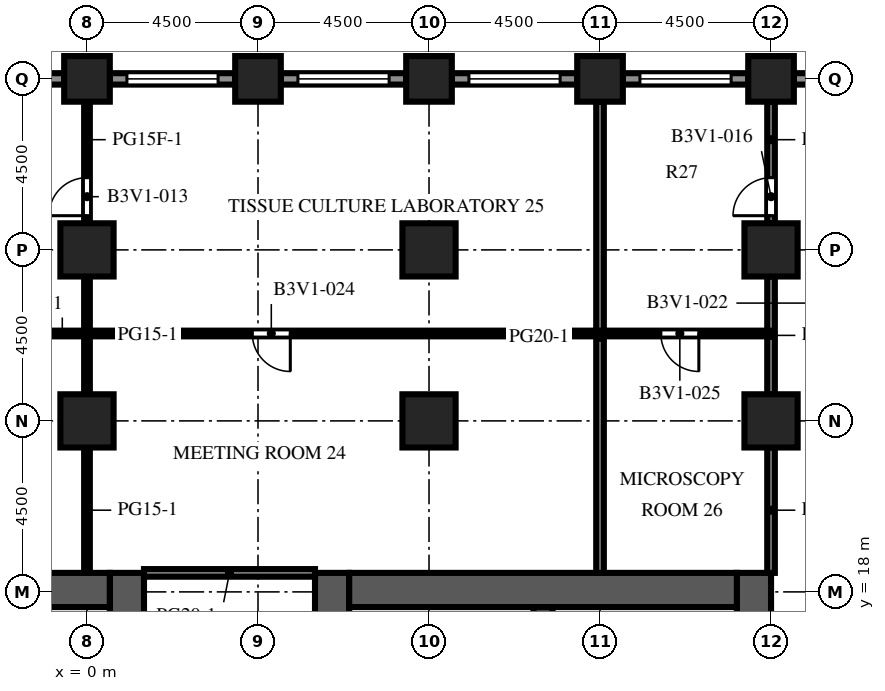
"""IFC4 building model, lengths in metres.
Left out: names, types, materials, properties, quantities, classifications, styles, units other than length and angle.
Written with IfcOpenShell. Run it as: python <this file> out.ifc"""

import sys

from ifc_helpers import new_model, si_unit, direction, frame, frame_2d, origin, origin_2d, place, context, subcontext, project, spatial, rectangle, extrude, element, fill, save


model = new_model("IFC4")
c1 = context("Model", 3, precision=1e-05, world=origin(), true_north=direction((0.0, 1.0)))
c2 = subcontext(c1, "Body", "Model", "MODEL_VIEW")
j1 = project(units=[si_unit("LENGTHUNIT", "METRE"), si_unit("PLANEANGLEUNIT", "RADIAN")], contexts=[c1])
p1 = place(None, origin())
s1 = spatial("IfcSite", under=j1, at=p1, CompositionType="ELEMENT")
p2 = place(p1, origin())
s2 = spatial("IfcBuilding", under=s1, at=p2, CompositionType="ELEMENT")
p3 = place(p2, frame((0.0, 0.0, 86.1)))
s3 = spatial("IfcBuildingStorey", under=s2, at=p3, CompositionType="ELEMENT", Elevation=86.1)
for number, where, z_axis, x_axis in (
    (1, (0.0, 31.5, 0.0), (0.0, 0.0, 1.0), (1.0, 0.0, 0.0)),
    (2, (4.5, 31.5, 0.0), (0.0, 0.0, 1.0), (1.0, 0.0, 0.0)),
    (3, (9.0, 31.5, 0.0), (0.0, 0.0, 1.0), (1.0, 0.0, 0.0)),
    (4, (13.5, 31.5, 0.0), (0.0, 0.0, 1.0), (1.0, 0.0, 0.0)),
    (5, (18.0, 31.5, 0.0), (0.0, 0.0, 1.0), (1.0, 0.0, 0.0)),
):
    element("IfcColumn", number, at=place(p3, frame(where, z_axis=z_axis, x_axis=x_axis)), inside=s3, PredefinedType="COLUMN", context=c2, shape_type="SweptSolid", body=[
        extrude(rectangle(XDim=1.2, YDim=1.2, at=origin_2d()), origin(), (0.0, 0.0, 1.0), 4.1),
    ])
for number, where, z_axis, x_axis in (
    (6, (0.0, 22.5, 0.0), (0.0, 0.0, 1.0), (1.0, 0.0, 0.0)),
    (7, (0.0, 27.0, 0.0), (0.0, 0.0, 1.0), (1.0, 0.0, 0.0)),
    (8, (9.0, 22.5, 0.0), (0.0, 0.0, 1.0), (1.0, 0.0, 0.0)),
    (9, (9.0, 27.0, 0.0), (0.0, 0.0, 1.0), (1.0, 0.0, 0.0)),
    (10, (18.0, 22.5, 0.0), (0.0, 0.0, 1.0), (1.0, 0.0, 0.0)),
    (11, (18.0, 27.0, 0.0), (0.0, 0.0, 1.0), (1.0, 0.0, 0.0)),
):
    element("IfcColumn", number, at=place(p3, frame(where, z_axis=z_axis, x_axis=x_axis)), inside=s3, PredefinedType="COLUMN", context=c2, shape_type="SweptSolid", body=[
        extrude(rectangle(XDim=1.4, YDim=1.4, at=origin_2d()), origin(), (0.0, 0.0, 1.0), 4.1),
    ])
p4 = place(p3, frame((1.05, -9.0, 0.0), z_axis=(0.0, 0.0, 1.0), x_axis=(0.0, 1.0, 0.0)))
e12 = element("IfcWall", 12, at=p4, inside=s3, PredefinedType="SHEAR", context=c2, shape_type="SweptSolid", body=[
    extrude(rectangle(XDim=27.5, YDim=0.9, at=frame_2d((13.75, 0.0))), origin(), (0.0, 0.0, 1.0), 4.1),
])
p5 = place(p4, frame((12.55, 0.0, 0.0)))
e13 = element("IfcOpeningElement", 13, at=p5, cuts=e12, PredefinedType="OPENING", context=c2, shape_type="SweptSolid", body=[
    extrude(rectangle(XDim=2.4, YDim=2.4, at=frame_2d((1.2, 1.2))), frame((0.0, 0.46, 0.0), z_axis=(0.0, -1.0, 0.0), x_axis=(1.0, 0.0, 0.0)), (0.0, 0.0, 1.0), 0.92),
])
p6 = place(p4, frame((3.975, 0.0, 0.0)))
e14 = element("IfcOpeningElement", 14, at=p6, cuts=e12, PredefinedType="OPENING", context=c2, shape_type="SweptSolid", body=[
    extrude(rectangle(XDim=1.2, YDim=2.1, at=frame_2d((0.6, 1.05))), frame((0.0, 0.46, 0.0), z_axis=(0.0, -1.0, 0.0), x_axis=(1.0, 0.0, 0.0)), (0.0, 0.0, 1.0), 0.92),
])
p7 = place(p4, frame((22.325, 0.0, 0.0)))
e15 = element("IfcOpeningElement", 15, at=p7, cuts=e12, PredefinedType="OPENING", context=c2, shape_type="SweptSolid", body=[
    extrude(rectangle(XDim=1.2, YDim=2.1, at=frame_2d((0.6, 1.05))), frame((0.0, 0.46, 0.0), z_axis=(0.0, -1.0, 0.0), x_axis=(1.0, 0.0, 0.0)), (0.0, 0.0, 1.0), 0.92),
])
p8 = place(p3, frame((-9.6, 18.05, 0.0), z_axis=(0.0, 0.0, 1.0), x_axis=(1.0, 0.0, 0.0)))
e16 = element("IfcWall", 16, at=p8, inside=s3, PredefinedType="SHEAR", context=c2, shape_type="SweptSolid", body=[
    extrude(rectangle(XDim=10.2, YDim=0.9, at=frame_2d((5.1, 0.0))), origin(), (0.0, 0.0, 1.0), 4.1),
])
p9 = place(p3, frame((6.45, -9.0, 0.0), z_axis=(0.0, 0.0, 1.0), x_axis=(0.0, 1.0, 0.0)))
e17 = element("IfcWall", 17, at=p9, inside=s3, PredefinedType="SHEAR", context=c2, shape_type="SweptSolid", body=[
    extrude(rectangle(XDim=27.5, YDim=0.9, at=frame_2d((13.75, 0.0))), origin(), (0.0, 0.0, 1.0), 4.1),
])
p10 = place(p9, frame((12.55, 0.0, 0.0)))
e18 = element("IfcOpeningElement", 18, at=p10, cuts=e17, PredefinedType="OPENING", context=c2, shape_type="SweptSolid", body=[
    extrude(rectangle(XDim=2.4, YDim=2.4, at=frame_2d((1.2, 1.2))), frame((0.0, 0.46, 0.0), z_axis=(0.0, -1.0, 0.0), x_axis=(1.0, 0.0, 0.0)), (0.0, 0.0, 1.0), 0.92),
])
p11 = place(p9, frame((3.975, 0.0, 0.0)))
e19 = element("IfcOpeningElement", 19, at=p11, cuts=e17, PredefinedType="OPENING", context=c2, shape_type="SweptSolid", body=[
    extrude(rectangle(XDim=1.2, YDim=2.1, at=frame_2d((0.6, 1.05))), frame((0.0, 0.46, 0.0), z_axis=(0.0, -1.0, 0.0), x_axis=(1.0, 0.0, 0.0)), (0.0, 0.0, 1.0), 0.92),
])
p12 = place(p9, frame((22.325, 0.0, 0.0)))
e20 = element("IfcOpeningElement", 20, at=p12, cuts=e17, PredefinedType="OPENING", context=c2, shape_type="SweptSolid", body=[
    extrude(rectangle(XDim=1.2, YDim=2.1, at=frame_2d((0.6, 1.05))), frame((0.0, 0.46, 0.0), z_axis=(0.0, -1.0, 0.0), x_axis=(1.0, 0.0, 0.0)), (0.0, 0.0, 1.0), 0.92),
])
p13 = place(p3, frame((17.55, -9.0, 0.0), z_axis=(0.0, 0.0, 1.0), x_axis=(0.0, 1.0, 0.0)))
e21 = element("IfcWall", 21, at=p13, inside=s3, PredefinedType="SHEAR", context=c2, shape_type="SweptSolid", body=[
    extrude(rectangle(XDim=27.5, YDim=0.9, at=frame_2d((13.75, 0.0))), origin(), (0.0, 0.0, 1.0), 4.1),
])
p14 = place(p13, frame((12.55, 0.0, 0.0)))
e22 = element("IfcOpeningElement", 22, at=p14, cuts=e21, PredefinedType="OPENING", context=c2, shape_type="SweptSolid", body=[
    extrude(rectangle(XDim=2.4, YDim=2.4, at=frame_2d((1.2, 1.2))), frame((0.0, 0.46, 0.0), z_axis=(0.0, -1.0, 0.0), x_axis=(1.0, 0.0, 0.0)), (0.0, 0.0, 1.0), 0.92),
])
p15 = place(p13, frame((6.825, 0.0, 0.0)))
e23 = element("IfcOpeningElement", 23, at=p15, cuts=e21, PredefinedType="OPENING", context=c2, shape_type="SweptSolid", body=[
    extrude(rectangle(XDim=1.2, YDim=2.1, at=frame_2d((0.6, 1.05))), frame((0.0, 0.46, 0.0), z_axis=(0.0, -1.0, 0.0), x_axis=(1.0, 0.0, 0.0)), (0.0, 0.0, 1.0), 0.92),
])
p16 = place(p13, frame((19.475, 0.0, 0.0)))
e24 = element("IfcOpeningElement", 24, at=p16, cuts=e21, PredefinedType="OPENING", context=c2, shape_type="SweptSolid", body=[
    extrude(rectangle(XDim=1.2, YDim=2.1, at=frame_2d((0.6, 1.05))), frame((0.0, 0.46, 0.0), z_axis=(0.0, -1.0, 0.0), x_axis=(1.0, 0.0, 0.0)), (0.0, 0.0, 1.0), 0.92),
])
p17 = place(p3, frame((6.9, 18.05, 0.0), z_axis=(0.0, 0.0, 1.0), x_axis=(1.0, 0.0, 0.0)))
e25 = element("IfcWall", 25, at=p17, inside=s3, PredefinedType="SHEAR", context=c2, shape_type="SweptSolid", body=[
    extrude(rectangle(XDim=10.2, YDim=0.9, at=frame_2d((5.1, 0.0))), origin(), (0.0, 0.0, 1.0), 4.1),
])
p18 = place(p3, frame((12.0, 10.25, 0.0), z_axis=(0.0, 0.0, 1.0), x_axis=(0.0, 1.0, 0.0)))
e26 = element("IfcWall", 26, at=p18, inside=s3, PredefinedType="SHEAR", context=c2, shape_type="SweptSolid", body=[
    extrude(rectangle(XDim=7.35, YDim=0.5, at=frame_2d((3.675, 0.0))), origin(), (0.0, 0.0, 1.0), 4.1),
])
p19 = place(p3, frame((18.6, 31.5, 0.0), z_axis=(0.0, 0.0, 1.0), x_axis=(1.0, 0.0, 0.0)))
e27 = element("IfcWall", 27, at=p19, inside=s3, PredefinedType="SOLIDWALL", context=c2, shape_type="SweptSolid", body=[
    extrude(rectangle(XDim=3.3, YDim=0.3, at=frame_2d((1.65, 0.0))), origin(), (0.0, 0.0, 1.0), 2.75),
])
p20 = place(p19, frame((1.15, 0.0, 0.0)))
e28 = element("IfcOpeningElement", 28, at=p20, cuts=e27, PredefinedType="OPENING", context=c2, shape_type="SweptSolid", body=[
    extrude(rectangle(XDim=1.0, YDim=2.2, at=frame_2d((0.5, 1.1))), frame((0.0, 0.16, 0.0), z_axis=(0.0, -1.0, 0.0), x_axis=(1.0, 0.0, 0.0)), (0.0, 0.0, 1.0), 0.32),
])
p21 = place(p3, frame((14.1, 31.5, 0.0), z_axis=(0.0, 0.0, 1.0), x_axis=(1.0, 0.0, 0.0)))
e29 = element("IfcWall", 29, at=p21, inside=s3, PredefinedType="SOLIDWALL", context=c2, shape_type="SweptSolid", body=[
    extrude(rectangle(XDim=3.3, YDim=0.3, at=frame_2d((1.65, 0.0))), origin(), (0.0, 0.0, 1.0), 2.75),
])
p22 = place(p21, frame((0.45, 0.0, 0.8)))
e30 = element("IfcOpeningElement", 30, at=p22, cuts=e29, PredefinedType="OPENING", context=c2, shape_type="SweptSolid", body=[
    extrude(rectangle(XDim=2.4, YDim=1.7, at=frame_2d((1.2, 0.85))), frame((0.0, 0.16, 0.0), z_axis=(0.0, -1.0, 0.0), x_axis=(1.0, 0.0, 0.0)), (0.0, 0.0, 1.0), 0.32),
])
p23 = place(p3, frame((9.6, 31.5, 0.0), z_axis=(0.0, 0.0, 1.0), x_axis=(1.0, 0.0, 0.0)))
e31 = element("IfcWall", 31, at=p23, inside=s3, PredefinedType="SOLIDWALL", context=c2, shape_type="SweptSolid", body=[
    extrude(rectangle(XDim=3.3, YDim=0.3, at=frame_2d((1.65, 0.0))), origin(), (0.0, 0.0, 1.0), 2.75),
])
p24 = place(p23, frame((0.45, 0.0, 0.8)))
e32 = element("IfcOpeningElement", 32, at=p24, cuts=e31, PredefinedType="OPENING", context=c2, shape_type="SweptSolid", body=[
    extrude(rectangle(XDim=2.4, YDim=1.7, at=frame_2d((1.2, 0.85))), frame((0.0, 0.16, 0.0), z_axis=(0.0, -1.0, 0.0), x_axis=(1.0, 0.0, 0.0)), (0.0, 0.0, 1.0), 0.32),
])
p25 = place(p3, frame((5.1, 31.5, 0.0), z_axis=(0.0, 0.0, 1.0), x_axis=(1.0, 0.0, 0.0)))
e33 = element("IfcWall", 33, at=p25, inside=s3, PredefinedType="SOLIDWALL", context=c2, shape_type="SweptSolid", body=[
    extrude(rectangle(XDim=3.3, YDim=0.3, at=frame_2d((1.65, 0.0))), origin(), (0.0, 0.0, 1.0), 2.75),
])
p26 = place(p25, frame((0.45, 0.0, 0.8)))
e34 = element("IfcOpeningElement", 34, at=p26, cuts=e33, PredefinedType="OPENING", context=c2, shape_type="SweptSolid", body=[
    extrude(rectangle(XDim=2.4, YDim=1.7, at=frame_2d((1.2, 0.85))), frame((0.0, 0.16, 0.0), z_axis=(0.0, -1.0, 0.0), x_axis=(1.0, 0.0, 0.0)), (0.0, 0.0, 1.0), 0.32),
])
p27 = place(p3, frame((0.6, 31.5, 0.0), z_axis=(0.0, 0.0, 1.0), x_axis=(1.0, 0.0, 0.0)))
e35 = element("IfcWall", 35, at=p27, inside=s3, PredefinedType="SOLIDWALL", context=c2, shape_type="SweptSolid", body=[
    extrude(rectangle(XDim=3.3, YDim=0.3, at=frame_2d((1.65, 0.0))), origin(), (0.0, 0.0, 1.0), 2.75),
])
p28 = place(p27, frame((0.45, 0.0, 0.8)))
e36 = element("IfcOpeningElement", 36, at=p28, cuts=e35, PredefinedType="OPENING", context=c2, shape_type="SweptSolid", body=[
    extrude(rectangle(XDim=2.4, YDim=1.7, at=frame_2d((1.2, 0.85))), frame((0.0, 0.16, 0.0), z_axis=(0.0, -1.0, 0.0), x_axis=(1.0, 0.0, 0.0)), (0.0, 0.0, 1.0), 0.32),
])
p29 = place(p3, frame((-3.9, 31.5, 0.0), z_axis=(0.0, 0.0, 1.0), x_axis=(1.0, 0.0, 0.0)))
e37 = element("IfcWall", 37, at=p29, inside=s3, PredefinedType="SOLIDWALL", context=c2, shape_type="SweptSolid", body=[
    extrude(rectangle(XDim=3.3, YDim=0.3, at=frame_2d((1.65, 0.0))), origin(), (0.0, 0.0, 1.0), 2.75),
])
p30 = place(p29, frame((0.45, 0.0, 0.8)))
e38 = element("IfcOpeningElement", 38, at=p30, cuts=e37, PredefinedType="OPENING", context=c2, shape_type="SweptSolid", body=[
    extrude(rectangle(XDim=2.4, YDim=1.7, at=frame_2d((1.2, 0.85))), frame((0.0, 0.16, 0.0), z_axis=(0.0, -1.0, 0.0), x_axis=(1.0, 0.0, 0.0)), (0.0, 0.0, 1.0), 0.32),
])
p31 = place(p3, frame((-0.8, 14.807, 0.0), z_axis=(0.0, 0.0, 1.0), x_axis=(0.0, 1.0, 0.0)))
e39 = element("IfcWall", 39, at=p31, inside=s3, PredefinedType="PARTITIONING", context=c2, shape_type="SweptSolid", body=[
    extrude(rectangle(XDim=2.793, YDim=0.1, at=frame_2d((1.396, 0.0))), origin(), (0.0, 0.0, 1.0), 3.65),
])
p32 = place(p31, frame((0.896, 0.0, 0.0)))
e40 = element("IfcOpeningElement", 40, at=p32, cuts=e39, PredefinedType="OPENING", context=c2, shape_type="SweptSolid", body=[
    extrude(rectangle(XDim=1.0, YDim=2.1, at=frame_2d((0.5, 1.05))), frame((0.0, 0.06, 0.0), z_axis=(0.0, -1.0, 0.0), x_axis=(1.0, 0.0, 0.0)), (0.0, 0.0, 1.0), 0.12),
])
p33 = place(p3, frame((8.3, 14.807, 0.0), z_axis=(0.0, 0.0, 1.0), x_axis=(0.0, 1.0, 0.0)))
e41 = element("IfcWall", 41, at=p33, inside=s3, PredefinedType="PARTITIONING", context=c2, shape_type="SweptSolid", body=[
    extrude(rectangle(XDim=2.793, YDim=0.1, at=frame_2d((1.396, 0.0))), origin(), (0.0, 0.0, 1.0), 3.65),
])
p34 = place(p33, frame((0.896, 0.0, 0.0)))
e42 = element("IfcOpeningElement", 42, at=p34, cuts=e41, PredefinedType="OPENING", context=c2, shape_type="SweptSolid", body=[
    extrude(rectangle(XDim=1.0, YDim=2.1, at=frame_2d((0.5, 1.05))), frame((0.0, 0.06, 0.0), z_axis=(0.0, -1.0, 0.0), x_axis=(1.0, 0.0, 0.0)), (0.0, 0.0, 1.0), 0.12),
])
p35 = place(p3, frame((0.0, 18.5, 0.0), z_axis=(0.0, 0.0, 1.0), x_axis=(0.0, 1.0, 0.0)))
e43 = element("IfcWall", 43, at=p35, inside=s3, PredefinedType="PARTITIONING", context=c2, shape_type="SweptSolid", body=[
    extrude(rectangle(XDim=3.3, YDim=0.15, at=frame_2d((1.65, 0.0))), origin(), (0.0, 0.0, 1.0), 3.65),
])
p36 = place(p3, frame((0.0, 23.2, 0.0), z_axis=(0.0, 0.0, 1.0), x_axis=(0.0, 1.0, 0.0)))
e44 = element("IfcWall", 44, at=p36, inside=s3, PredefinedType="PARTITIONING", context=c2, shape_type="SweptSolid", body=[
    extrude(rectangle(XDim=3.1, YDim=0.15, at=frame_2d((1.55, 0.0))), origin(), (0.0, 0.0, 1.0), 3.65),
])
p37 = place(p3, frame((0.0, 30.9, 0.0), z_axis=(0.0, 0.0, 1.0), x_axis=(0.0, -1.0, 0.0)))
e45 = element("IfcWall", 45, at=p37, inside=s3, PredefinedType="PARTITIONING", context=c2, shape_type="SweptSolid", body=[
    extrude(rectangle(XDim=3.2, YDim=0.15, at=frame_2d((1.6, 0.0))), origin(), (0.0, 0.0, 1.0), 3.65),
])
p38 = place(p37, frame((2.0, 0.0, 0.0)))
e46 = element("IfcOpeningElement", 46, at=p38, cuts=e45, PredefinedType="OPENING", context=c2, shape_type="SweptSolid", body=[
    extrude(rectangle(XDim=1.0, YDim=2.1, at=frame_2d((0.5, 1.05))), frame((0.0, 0.085, 0.0), z_axis=(0.0, -1.0, 0.0), x_axis=(1.0, 0.0, 0.0)), (0.0, 0.0, 1.0), 0.17),
])
p39 = place(p3, frame((13.5, 18.5, 0.0), z_axis=(0.0, 0.0, 1.0), x_axis=(0.0, 1.0, 0.0)))
e47 = element("IfcWall", 47, at=p39, inside=s3, PredefinedType="PARTITIONING", context=c2, shape_type="SweptSolid", body=[
    extrude(rectangle(XDim=12.4, YDim=0.2, at=frame_2d((6.2, 0.0))), origin(), (0.0, 0.0, 1.0), 3.65),
])
p40 = place(p3, frame((18.0, 18.5, 0.0), z_axis=(0.0, 0.0, 1.0), x_axis=(0.0, 1.0, 0.0)))
e48 = element("IfcWall", 48, at=p40, inside=s3, PredefinedType="PARTITIONING", context=c2, shape_type="SweptSolid", body=[
    extrude(rectangle(XDim=3.3, YDim=0.2, at=frame_2d((1.65, 0.0))), origin(), (0.0, 0.0, 1.0), 3.65),
])
p41 = place(p3, frame((18.0, 23.2, 0.0), z_axis=(0.0, 0.0, 1.0), x_axis=(0.0, 1.0, 0.0)))
e49 = element("IfcWall", 49, at=p41, inside=s3, PredefinedType="PARTITIONING", context=c2, shape_type="SweptSolid", body=[
    extrude(rectangle(XDim=3.1, YDim=0.2, at=frame_2d((1.55, 0.0))), origin(), (0.0, 0.0, 1.0), 3.65),
])
p42 = place(p3, frame((18.0, 27.7, 0.0), z_axis=(0.0, 0.0, 1.0), x_axis=(0.0, 1.0, 0.0)))
e50 = element("IfcWall", 50, at=p42, inside=s3, PredefinedType="PARTITIONING", context=c2, shape_type="SweptSolid", body=[
    extrude(rectangle(XDim=3.2, YDim=0.2, at=frame_2d((1.6, 0.0))), origin(), (0.0, 0.0, 1.0), 3.65),
])
p43 = place(p42, frame((0.2, 0.0, 0.0)))
e51 = element("IfcOpeningElement", 51, at=p43, cuts=e50, PredefinedType="OPENING", context=c2, shape_type="SweptSolid", body=[
    extrude(rectangle(XDim=1.0, YDim=2.1, at=frame_2d((0.5, 1.05))), frame((0.0, 0.11, 0.0), z_axis=(0.0, -1.0, 0.0), x_axis=(1.0, 0.0, 0.0)), (0.0, 0.0, 1.0), 0.22),
])
p44 = place(p3, frame((1.5, 18.5, 0.0), z_axis=(0.0, 0.0, 1.0), x_axis=(1.0, 0.0, 0.0)))
e52 = element("IfcWall", 52, at=p44, inside=s3, PredefinedType="PARTITIONING", context=c2, shape_type="SweptSolid", body=[
    extrude(rectangle(XDim=4.5, YDim=0.2, at=frame_2d((2.25, 0.0))), origin(), (0.0, 0.0, 1.0), 3.65),
])
p45 = place(p3, frame((18.0, 24.8, 0.0), z_axis=(0.0, 0.0, 1.0), x_axis=(-1.0, 0.0, 0.0)))
e53 = element("IfcWall", 53, at=p45, inside=s3, PredefinedType="PARTITIONING", context=c2, shape_type="SweptSolid", body=[
    extrude(rectangle(XDim=28.5, YDim=0.15, at=frame_2d((14.25, 0.0))), origin(), (0.0, 0.0, 1.0), 3.65),
])
p46 = place(p45, frame((23.65, 0.0, 0.0)))
e54 = element("IfcOpeningElement", 54, at=p46, cuts=e53, PredefinedType="OPENING", context=c2, shape_type="SweptSolid", body=[
    extrude(rectangle(XDim=1.0, YDim=2.1, at=frame_2d((0.5, 1.05))), frame((0.0, 0.085, 0.0), z_axis=(0.0, -1.0, 0.0), x_axis=(1.0, 0.0, 0.0)), (0.0, 0.0, 1.0), 0.17),
])
p47 = place(p45, frame((12.65, 0.0, 0.0)))
e55 = element("IfcOpeningElement", 55, at=p47, cuts=e53, PredefinedType="OPENING", context=c2, shape_type="SweptSolid", body=[
    extrude(rectangle(XDim=1.0, YDim=2.1, at=frame_2d((0.5, 1.05))), frame((0.0, 0.085, 0.0), z_axis=(0.0, -1.0, 0.0), x_axis=(1.0, 0.0, 0.0)), (0.0, 0.0, 1.0), 0.17),
])
p48 = place(p45, frame((1.9, 0.0, 0.0)))
e56 = element("IfcOpeningElement", 56, at=p48, cuts=e53, PredefinedType="OPENING", context=c2, shape_type="SweptSolid", body=[
    extrude(rectangle(XDim=1.0, YDim=2.1, at=frame_2d((0.5, 1.05))), frame((0.0, 0.085, 0.0), z_axis=(0.0, -1.0, 0.0), x_axis=(1.0, 0.0, 0.0)), (0.0, 0.0, 1.0), 0.17),
])
p49 = place(p22, origin())
e57 = element("IfcWindow", 57, at=p49, inside=s3, PartitioningType="SINGLE_PANEL", PredefinedType="WINDOW", context=c2, shape_type="SweptSolid", body=[
    extrude(rectangle(XDim=2.4, YDim=1.7, at=frame_2d((1.2, 0.85))), frame((0.0, 0.03, 0.0), z_axis=(0.0, -1.0, 0.0), x_axis=(1.0, 0.0, 0.0)), (0.0, 0.0, 1.0), 0.06),
])
fill(e30, e57)
p50 = place(p24, origin())
e58 = element("IfcWindow", 58, at=p50, inside=s3, PartitioningType="SINGLE_PANEL", PredefinedType="WINDOW", context=c2, shape_type="SweptSolid", body=[
    extrude(rectangle(XDim=2.4, YDim=1.7, at=frame_2d((1.2, 0.85))), frame((0.0, 0.03, 0.0), z_axis=(0.0, -1.0, 0.0), x_axis=(1.0, 0.0, 0.0)), (0.0, 0.0, 1.0), 0.06),
])
fill(e32, e58)
p51 = place(p26, origin())
e59 = element("IfcWindow", 59, at=p51, inside=s3, PartitioningType="SINGLE_PANEL", PredefinedType="WINDOW", context=c2, shape_type="SweptSolid", body=[
    extrude(rectangle(XDim=2.4, YDim=1.7, at=frame_2d((1.2, 0.85))), frame((0.0, 0.03, 0.0), z_axis=(0.0, -1.0, 0.0), x_axis=(1.0, 0.0, 0.0)), (0.0, 0.0, 1.0), 0.06),
])
fill(e34, e59)
p52 = place(p28, origin())
e60 = element("IfcWindow", 60, at=p52, inside=s3, PartitioningType="SINGLE_PANEL", PredefinedType="WINDOW", context=c2, shape_type="SweptSolid", body=[
    extrude(rectangle(XDim=2.4, YDim=1.7, at=frame_2d((1.2, 0.85))), frame((0.0, 0.03, 0.0), z_axis=(0.0, -1.0, 0.0), x_axis=(1.0, 0.0, 0.0)), (0.0, 0.0, 1.0), 0.06),
])
fill(e36, e60)
p53 = place(p38, origin())
e61 = element("IfcDoor", 61, at=p53, inside=s3, OperationType="SINGLE_SWING_RIGHT", PredefinedType="DOOR", context=c2, shape_type="SweptSolid", body=[
    extrude(rectangle(XDim=1.0, YDim=2.1, at=frame_2d((0.5, 1.05))), frame((0.0, 0.025, 0.0), z_axis=(0.0, -1.0, 0.0), x_axis=(1.0, 0.0, 0.0)), (0.0, 0.0, 1.0), 0.05),
])
fill(e46, e61)
p54 = place(p43, origin())
e62 = element("IfcDoor", 62, at=p54, inside=s3, OperationType="SINGLE_SWING_LEFT", PredefinedType="DOOR", context=c2, shape_type="SweptSolid", body=[
    extrude(rectangle(XDim=1.0, YDim=2.1, at=frame_2d((0.5, 1.05))), frame((0.0, 0.025, 0.0), z_axis=(0.0, -1.0, 0.0), x_axis=(1.0, 0.0, 0.0)), (0.0, 0.0, 1.0), 0.05),
])
fill(e51, e62)
p55 = place(p47, origin())
e63 = element("IfcDoor", 63, at=p55, inside=s3, OperationType="SINGLE_SWING_LEFT", PredefinedType="DOOR", context=c2, shape_type="SweptSolid", body=[
    extrude(rectangle(XDim=1.0, YDim=2.1, at=frame_2d((0.5, 1.05))), frame((0.0, 0.025, 0.0), z_axis=(0.0, -1.0, 0.0), x_axis=(1.0, 0.0, 0.0)), (0.0, 0.0, 1.0), 0.05),
])
fill(e55, e63)
p56 = place(p48, origin())
e64 = element("IfcDoor", 64, at=p56, inside=s3, OperationType="SINGLE_SWING_LEFT", PredefinedType="DOOR", context=c2, shape_type="SweptSolid", body=[
    extrude(rectangle(XDim=1.0, YDim=2.1, at=frame_2d((0.5, 1.05))), frame((0.0, 0.025, 0.0), z_axis=(0.0, -1.0, 0.0), x_axis=(1.0, 0.0, 0.0)), (0.0, 0.0, 1.0), 0.05),
])
fill(e56, e64)
save(model, sys.argv[1])
